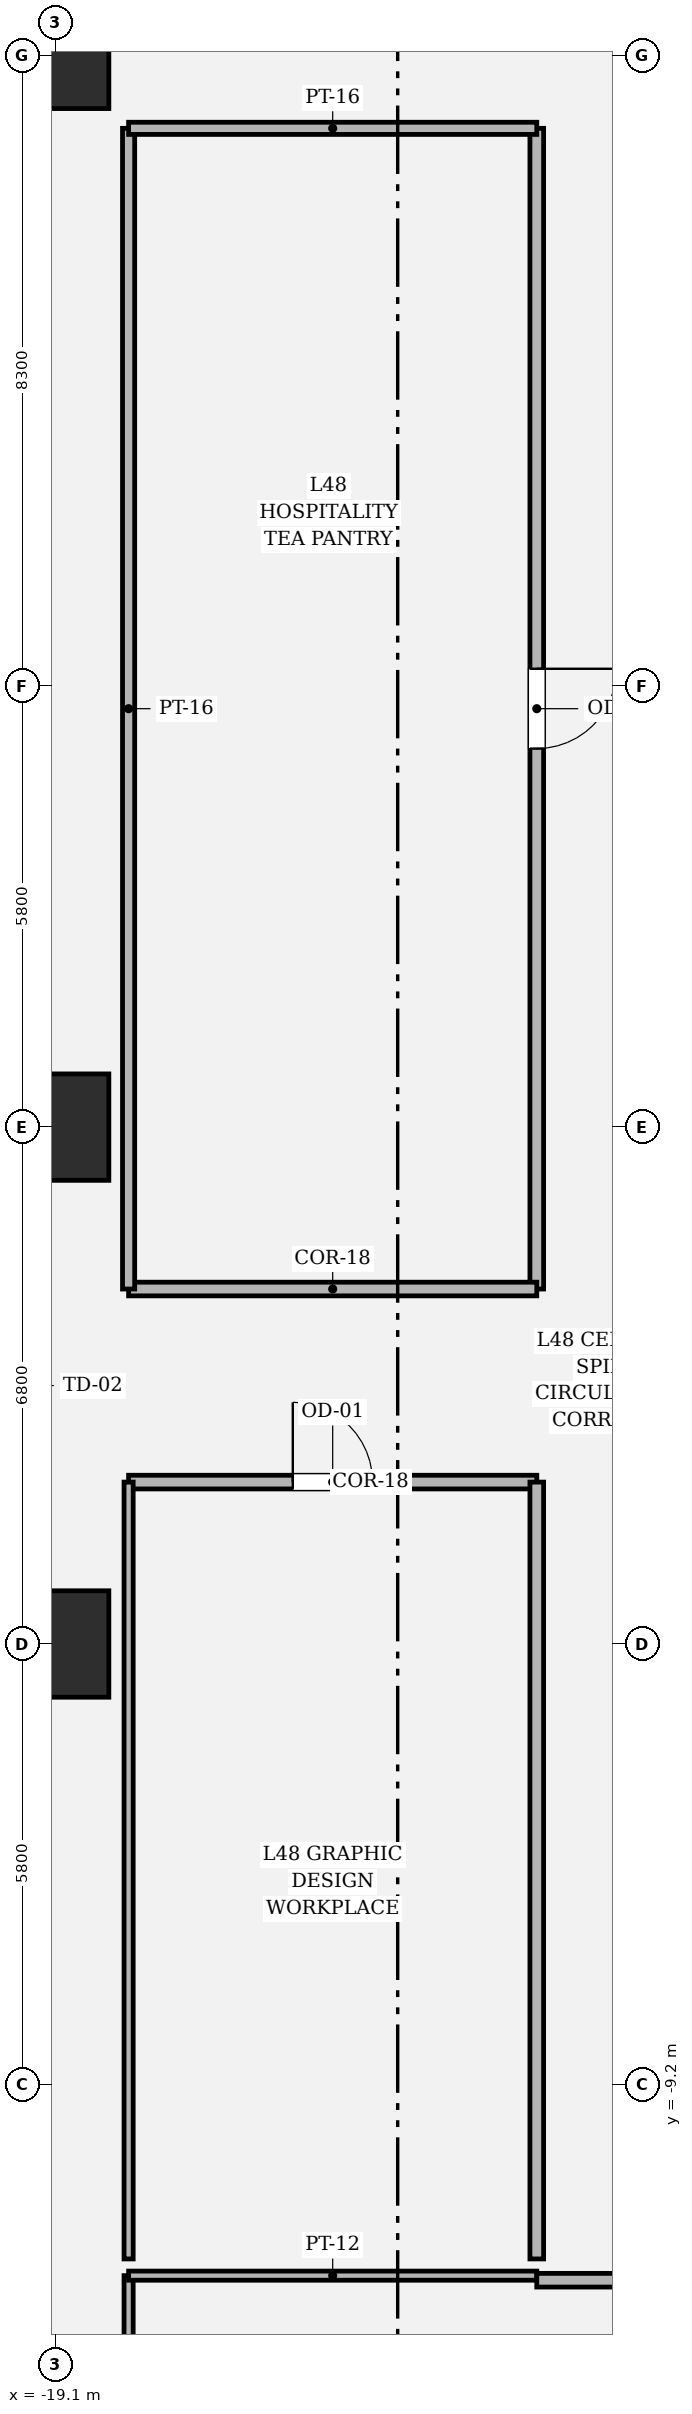
"""IFC4 building model, lengths in metres.
Left out: names, types, materials, properties, quantities, classifications, styles, units other than length and angle.
Written with IfcOpenShell. Run it as: python <this file> out.ifc"""

import sys

from ifc_helpers import new_model, si_unit, direction, frame, frame_2d, origin, origin_2d, place, context, subcontext, project, spatial, rectangle, hollow_rectangle, extrude, element, fill, save


model = new_model("IFC4")
c1 = context("Model", 3, precision=1e-05, world=origin(), true_north=direction((0.0, 1.0)))
c2 = subcontext(c1, "Body", "Model", "MODEL_VIEW")
j1 = project(units=[si_unit("LENGTHUNIT", "METRE"), si_unit("PLANEANGLEUNIT", "RADIAN")], contexts=[c1])
p1 = place(None, origin())
s1 = spatial("IfcSite", under=j1, at=p1, CompositionType="ELEMENT")
p2 = place(p1, origin())
s2 = spatial("IfcBuilding", under=s1, at=p2, CompositionType="ELEMENT")
p3 = place(p2, frame((0.0, 0.0, 204.6)))
s3 = spatial("IfcBuildingStorey", under=s2, at=p3, CompositionType="ELEMENT", Elevation=204.6)
for number, where, z_axis, x_axis in (
    (1, (-19.1, 17.5, 0.0), (0.0, 0.0, 1.0), (1.0, 0.0, 0.0)),
    (2, (-19.1, 3.4, 0.0), (0.0, 0.0, 1.0), (1.0, 0.0, 0.0)),
    (3, (-19.1, -3.4, 0.0), (0.0, 0.0, 1.0), (1.0, 0.0, 0.0)),
):
    element("IfcColumn", number, at=place(p3, frame(where, z_axis=z_axis, x_axis=x_axis)), inside=s3, PredefinedType="COLUMN", context=c2, shape_type="SweptSolid", body=[
        extrude(hollow_rectangle(XDim=1.4, YDim=1.4, WallThickness=0.042, at=origin_2d()), origin(), (0.0, 0.0, 1.0), 4.05),
    ])
p4 = place(p3, frame((-18.549, 18.047, 0.0), z_axis=(0.0, 0.0, 1.0), x_axis=(-0.707106781187, -0.707106781187, 0.0)))
e4 = element("IfcWall", 4, at=p4, inside=s3, PredefinedType="SOLIDWALL", context=c2, shape_type="SweptSolid", body=[
    extrude(rectangle(XDim=1.552, YDim=0.32, at=frame_2d((0.776, 0.0))), origin(), (0.0, 0.0, 1.0), 3.174),
])
p5 = place(p3, frame((-18.14, -22.44, 0.0), z_axis=(0.0, 0.0, 1.0), x_axis=(0.0, 1.0, 0.0)))
e5 = element("IfcWall", 5, at=p5, inside=s3, PredefinedType="PARTITIONING", context=c2, shape_type="SweptSolid", body=[
    extrude(rectangle(XDim=10.73, YDim=0.12, at=frame_2d((5.365, 0.0))), origin(), (0.0, 0.0, 1.0), 3.174),
])
p6 = place(p3, frame((-18.14, -11.71, 0.0), z_axis=(0.0, 0.0, 1.0), x_axis=(1.0, 0.0, 0.0)))
e6 = element("IfcWall", 6, at=p6, inside=s3, PredefinedType="PARTITIONING", context=c2, shape_type="SweptSolid", body=[
    extrude(rectangle(XDim=5.37, YDim=0.12, at=frame_2d((2.685, 0.0))), origin(), (0.0, 0.0, 1.0), 3.424),
])
p7 = place(p3, frame((-12.77, -11.77, 0.0), z_axis=(0.0, 0.0, 1.0), x_axis=(1.0, 0.0, 0.0)))
e7 = element("IfcWall", 7, at=p7, inside=s3, PredefinedType="PARTITIONING", context=c2, shape_type="SweptSolid", body=[
    extrude(rectangle(XDim=8.165, YDim=0.18, at=frame_2d((4.083, 0.0))), origin(), (0.0, 0.0, 1.0), 3.174),
])
p8 = place(p7, frame((3.558, 0.0, 0.0)))
e8 = element("IfcOpeningElement", 8, at=p8, cuts=e7, PredefinedType="OPENING", context=c2, shape_type="SweptSolid", body=[
    extrude(rectangle(XDim=1.05, YDim=2.2, at=frame_2d((0.525, 1.1))), frame((0.0, 0.1, 0.0), z_axis=(0.0, -1.0, 0.0), x_axis=(1.0, 0.0, 0.0)), (0.0, 0.0, 1.0), 0.2),
])
p9 = place(p3, frame((-18.14, -1.27, 0.0), z_axis=(0.0, 0.0, 1.0), x_axis=(1.0, 0.0, 0.0)))
e9 = element("IfcWall", 9, at=p9, inside=s3, PredefinedType="PARTITIONING", context=c2, shape_type="SweptSolid", body=[
    extrude(rectangle(XDim=5.37, YDim=0.18, at=frame_2d((2.685, 0.0))), origin(), (0.0, 0.0, 1.0), 3.83),
])
p10 = place(p9, frame((2.16, 0.0, 0.0)))
e10 = element("IfcOpeningElement", 10, at=p10, cuts=e9, PredefinedType="OPENING", context=c2, shape_type="SweptSolid", body=[
    extrude(rectangle(XDim=1.05, YDim=2.2, at=frame_2d((0.525, 1.1))), frame((0.0, 0.1, 0.0), z_axis=(0.0, -1.0, 0.0), x_axis=(1.0, 0.0, 0.0)), (0.0, 0.0, 1.0), 0.2),
])
p11 = place(p3, frame((-12.77, -1.27, 0.0), z_axis=(0.0, 0.0, 1.0), x_axis=(0.0, -1.0, 0.0)))
e11 = element("IfcWall", 11, at=p11, inside=s3, PredefinedType="PARTITIONING", context=c2, shape_type="SweptSolid", body=[
    extrude(rectangle(XDim=10.22, YDim=0.18, at=frame_2d((5.11, 0.0))), origin(), (0.0, 0.0, 1.0), 3.174),
])
p12 = place(p3, frame((-18.14, -11.49, 0.0), z_axis=(0.0, 0.0, 1.0), x_axis=(0.0, 1.0, 0.0)))
e12 = element("IfcWall", 12, at=p12, inside=s3, PredefinedType="PARTITIONING", context=c2, shape_type="SweptSolid", body=[
    extrude(rectangle(XDim=10.22, YDim=0.12, at=frame_2d((5.11, 0.0))), origin(), (0.0, 0.0, 1.0), 3.174),
])
p13 = place(p3, frame((-12.77, 16.54, 0.0), z_axis=(0.0, 0.0, 1.0), x_axis=(0.0, -1.0, 0.0)))
e13 = element("IfcWall", 13, at=p13, inside=s3, PredefinedType="PARTITIONING", context=c2, shape_type="SweptSolid", body=[
    extrude(rectangle(XDim=15.27, YDim=0.18, at=frame_2d((7.635, 0.0))), origin(), (0.0, 0.0, 1.0), 3.174),
])
p14 = place(p13, frame((7.11, 0.0, 0.0)))
e14 = element("IfcOpeningElement", 14, at=p14, cuts=e13, PredefinedType="OPENING", context=c2, shape_type="SweptSolid", body=[
    extrude(rectangle(XDim=1.05, YDim=2.2, at=frame_2d((0.525, 1.1))), frame((0.0, 0.1, 0.0), z_axis=(0.0, -1.0, 0.0), x_axis=(1.0, 0.0, 0.0)), (0.0, 0.0, 1.0), 0.2),
])
p15 = place(p3, frame((-12.77, 1.27, 0.0), z_axis=(0.0, 0.0, 1.0), x_axis=(-1.0, 0.0, 0.0)))
e15 = element("IfcWall", 15, at=p15, inside=s3, PredefinedType="PARTITIONING", context=c2, shape_type="SweptSolid", body=[
    extrude(rectangle(XDim=5.37, YDim=0.18, at=frame_2d((2.685, 0.0))), origin(), (0.0, 0.0, 1.0), 3.83),
])
p16 = place(p3, frame((-18.14, 1.27, 0.0), z_axis=(0.0, 0.0, 1.0), x_axis=(0.0, 1.0, 0.0)))
e16 = element("IfcWall", 16, at=p16, inside=s3, PredefinedType="PARTITIONING", context=c2, shape_type="SweptSolid", body=[
    extrude(rectangle(XDim=15.27, YDim=0.16, at=frame_2d((7.635, 0.0))), origin(), (0.0, 0.0, 1.0), 3.174),
])
p17 = place(p3, frame((-18.14, 16.54, 0.0), z_axis=(0.0, 0.0, 1.0), x_axis=(1.0, 0.0, 0.0)))
e17 = element("IfcWall", 17, at=p17, inside=s3, PredefinedType="PARTITIONING", context=c2, shape_type="SweptSolid", body=[
    extrude(rectangle(XDim=5.37, YDim=0.16, at=frame_2d((2.685, 0.0))), origin(), (0.0, 0.0, 1.0), 3.424),
])
p18 = place(p10, origin())
e18 = element("IfcDoor", 18, at=p18, inside=s3, OperationType="SINGLE_SWING_LEFT", PredefinedType="DOOR", context=c2, shape_type="SweptSolid", body=[
    extrude(rectangle(XDim=1.05, YDim=2.2, at=frame_2d((0.525, 1.1))), frame((0.0, 0.025, 0.0), z_axis=(0.0, -1.0, 0.0), x_axis=(1.0, 0.0, 0.0)), (0.0, 0.0, 1.0), 0.05),
])
fill(e10, e18)
p19 = place(p14, origin())
e19 = element("IfcDoor", 19, at=p19, inside=s3, OperationType="SINGLE_SWING_LEFT", PredefinedType="DOOR", context=c2, shape_type="SweptSolid", body=[
    extrude(rectangle(XDim=1.05, YDim=2.2, at=frame_2d((0.525, 1.1))), frame((0.0, 0.025, 0.0), z_axis=(0.0, -1.0, 0.0), x_axis=(1.0, 0.0, 0.0)), (0.0, 0.0, 1.0), 0.05),
])
fill(e14, e19)
save(model, sys.argv[1])
